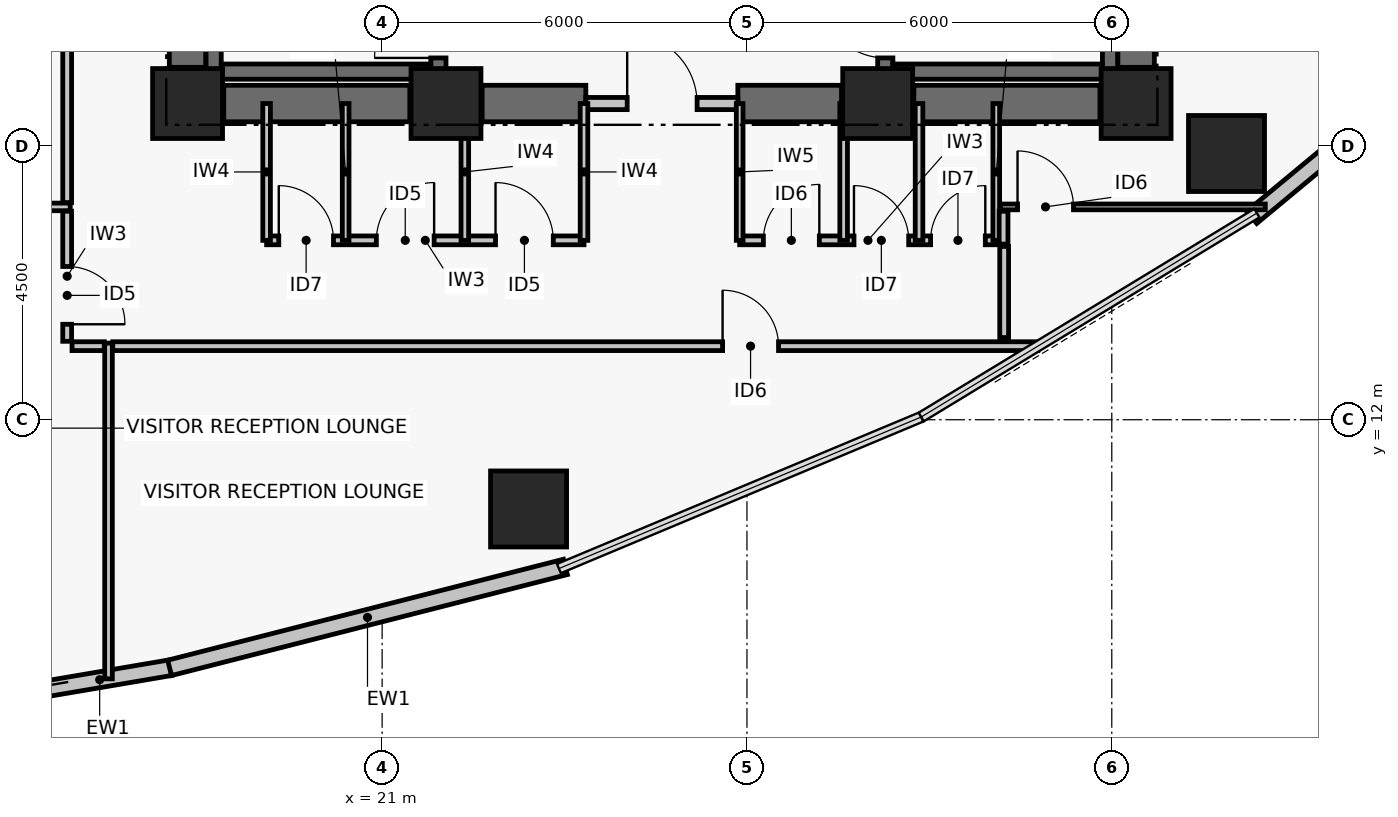
"""IFC4 building model, lengths in metres.
Left out: names, types, materials, properties, quantities, classifications, styles, units other than length and angle.
Written with IfcOpenShell. Run it as: python <this file> out.ifc"""

import sys

from ifc_helpers import new_model, si_unit, direction, frame, frame_2d, origin, origin_2d, place, context, subcontext, project, spatial, rectangle, hollow_rectangle, extrude, element, fill, save


model = new_model("IFC4")
c1 = context("Model", 3, precision=1e-05, world=origin(), true_north=direction((0.0, 1.0)))
c2 = subcontext(c1, "Body", "Model", "MODEL_VIEW")
j1 = project(units=[si_unit("LENGTHUNIT", "METRE"), si_unit("PLANEANGLEUNIT", "RADIAN")], contexts=[c1])
p1 = place(None, origin())
s1 = spatial("IfcSite", under=j1, at=p1, CompositionType="ELEMENT")
p2 = place(p1, origin())
s2 = spatial("IfcBuilding", under=s1, at=p2, CompositionType="ELEMENT")
p3 = place(p2, frame((0.0, 0.0, 72.24)))
s3 = spatial("IfcBuildingStorey", under=s2, at=p3, CompositionType="ELEMENT", Elevation=72.24)
for number, where, z_axis, x_axis in (
    (1, (17.8, 17.2, 0.0), (0.0, 0.0, 1.0), (1.0, 0.0, 0.0)),
    (2, (22.05, 17.2, 0.0), (0.0, 0.0, 1.0), (1.0, 0.0, 0.0)),
    (3, (29.15, 17.2, 0.0), (0.0, 0.0, 1.0), (1.0, 0.0, 0.0)),
    (4, (33.4, 17.2, 0.0), (0.0, 0.0, 1.0), (1.0, 0.0, 0.0)),
):
    element("IfcColumn", number, at=place(p3, frame(where, z_axis=z_axis, x_axis=x_axis)), inside=s3, PredefinedType="COLUMN", context=c2, shape_type="SweptSolid", body=[
        extrude(rectangle(XDim=1.15, YDim=1.15, at=origin_2d()), origin(), (0.0, 0.0, 1.0), 3.72),
    ])
p4 = place(p3, frame((18.395, 17.2, 0.0), z_axis=(0.0, 0.0, 1.0), x_axis=(1.0, 0.0, 0.0)))
e5 = element("IfcWall", 5, at=p4, inside=s3, PredefinedType="SHEAR", context=c2, shape_type="SweptSolid", body=[
    extrude(rectangle(XDim=3.06, YDim=0.6, at=frame_2d((1.53, 0.0))), origin(), (0.0, 0.0, 1.0), 3.47),
])
p5 = place(p3, frame((22.645, 17.2, 0.0), z_axis=(0.0, 0.0, 1.0), x_axis=(1.0, 0.0, 0.0)))
e6 = element("IfcWall", 6, at=p5, inside=s3, PredefinedType="SHEAR", context=c2, shape_type="SweptSolid", body=[
    extrude(rectangle(XDim=1.705, YDim=0.6, at=frame_2d((0.853, 0.0))), origin(), (0.0, 0.0, 1.0), 3.47),
])
p6 = place(p3, frame((26.85, 17.2, 0.0), z_axis=(0.0, 0.0, 1.0), x_axis=(1.0, 0.0, 0.0)))
e7 = element("IfcWall", 7, at=p6, inside=s3, PredefinedType="SHEAR", context=c2, shape_type="SweptSolid", body=[
    extrude(rectangle(XDim=1.705, YDim=0.6, at=frame_2d((0.853, 0.0))), origin(), (0.0, 0.0, 1.0), 3.47),
])
p7 = place(p3, frame((29.745, 17.2, 0.0), z_axis=(0.0, 0.0, 1.0), x_axis=(1.0, 0.0, 0.0)))
e8 = element("IfcWall", 8, at=p7, inside=s3, PredefinedType="SHEAR", context=c2, shape_type="SweptSolid", body=[
    extrude(rectangle(XDim=3.06, YDim=0.6, at=frame_2d((1.53, 0.0))), origin(), (0.0, 0.0, 1.0), 3.47),
])
for number, where, z_axis, x_axis in (
    (9, (17.8, 17.795, 0.0), (0.0, 0.0, 1.0), (0.0, 1.0, 0.0)),
    (10, (33.4, 17.795, 0.0), (0.0, 0.0, 1.0), (0.0, 1.0, 0.0)),
):
    element("IfcWall", number, at=place(p3, frame(where, z_axis=z_axis, x_axis=x_axis)), inside=s3, PredefinedType="SHEAR", context=c2, shape_type="SweptSolid", body=[
        extrude(rectangle(XDim=8.41, YDim=0.6, at=frame_2d((4.205, 0.0))), origin(), (0.0, 0.0, 1.0), 3.47),
    ])
p8 = place(p3, frame((18.229, 17.6, 0.0), z_axis=(0.0, 0.0, 1.0), x_axis=(0.0, 1.0, 0.0)))
e11 = element("IfcWall", 11, at=p8, inside=s3, PredefinedType="SHEAR", context=c2, shape_type="SweptSolid", body=[
    extrude(rectangle(XDim=8.8, YDim=0.25, at=frame_2d((4.4, 0.0))), origin(), (0.0, 0.0, 1.0), 3.47),
])
p9 = place(p3, frame((21.925, 17.6, 0.0), z_axis=(0.0, 0.0, 1.0), x_axis=(0.0, 1.0, 0.0)))
e12 = element("IfcWall", 12, at=p9, inside=s3, PredefinedType="SHEAR", context=c2, shape_type="SweptSolid", body=[
    extrude(rectangle(XDim=8.8, YDim=0.25, at=frame_2d((4.4, 0.0))), origin(), (0.0, 0.0, 1.0), 3.47),
])
p10 = place(p9, frame((0.35, 0.0, 0.0)))
e13 = element("IfcOpeningElement", 13, at=p10, cuts=e12, PredefinedType="OPENING", context=c2, shape_type="SweptSolid", body=[
    extrude(rectangle(XDim=1.05, YDim=2.08, at=frame_2d((0.525, 1.04))), frame((0.0, 0.135, 0.0), z_axis=(0.0, -1.0, 0.0), x_axis=(1.0, 0.0, 0.0)), (0.0, 0.0, 1.0), 0.27),
])
p11 = place(p3, frame((18.354, 17.725, 0.0), z_axis=(0.0, 0.0, 1.0), x_axis=(1.0, 0.0, 0.0)))
e14 = element("IfcWall", 14, at=p11, inside=s3, PredefinedType="SHEAR", context=c2, shape_type="SweptSolid", body=[
    extrude(rectangle(XDim=3.446, YDim=0.25, at=frame_2d((1.723, 0.0))), origin(), (0.0, 0.0, 1.0), 3.47),
])
p12 = place(p3, frame((29.275, 17.6, 0.0), z_axis=(0.0, 0.0, 1.0), x_axis=(0.0, 1.0, 0.0)))
e15 = element("IfcWall", 15, at=p12, inside=s3, PredefinedType="SHEAR", context=c2, shape_type="SweptSolid", body=[
    extrude(rectangle(XDim=8.8, YDim=0.25, at=frame_2d((4.4, 0.0))), origin(), (0.0, 0.0, 1.0), 3.47),
])
p13 = place(p12, frame((0.35, 0.0, 0.0)))
e16 = element("IfcOpeningElement", 16, at=p13, cuts=e15, PredefinedType="OPENING", context=c2, shape_type="SweptSolid", body=[
    extrude(rectangle(XDim=1.05, YDim=2.08, at=frame_2d((0.525, 1.04))), frame((0.0, 0.135, 0.0), z_axis=(0.0, -1.0, 0.0), x_axis=(1.0, 0.0, 0.0)), (0.0, 0.0, 1.0), 0.27),
])
p14 = place(p3, frame((32.971, 17.6, 0.0), z_axis=(0.0, 0.0, 1.0), x_axis=(0.0, 1.0, 0.0)))
e17 = element("IfcWall", 17, at=p14, inside=s3, PredefinedType="SHEAR", context=c2, shape_type="SweptSolid", body=[
    extrude(rectangle(XDim=8.8, YDim=0.25, at=frame_2d((4.4, 0.0))), origin(), (0.0, 0.0, 1.0), 3.47),
])
p15 = place(p3, frame((29.4, 17.725, 0.0), z_axis=(0.0, 0.0, 1.0), x_axis=(1.0, 0.0, 0.0)))
e18 = element("IfcWall", 18, at=p15, inside=s3, PredefinedType="SHEAR", context=c2, shape_type="SweptSolid", body=[
    extrude(rectangle(XDim=3.446, YDim=0.25, at=frame_2d((1.723, 0.0))), origin(), (0.0, 0.0, 1.0), 3.47),
])
for number, where, z_axis, x_axis in (
    (19, (23.408, 10.533, 0.0), (0.0, 0.0, 1.0), (1.0, 0.0, 0.0)),
    (20, (34.887, 16.378, 0.0), (0.0, 0.0, 1.0), (1.0, 0.0, 0.0)),
):
    element("IfcColumn", number, at=place(p3, frame(where, z_axis=z_axis, x_axis=x_axis)), inside=s3, PredefinedType="COLUMN", context=c2, shape_type="SweptSolid", body=[
        extrude(hollow_rectangle(XDim=1.25, YDim=1.25, WallThickness=0.05, at=origin_2d()), origin(), (0.0, 0.0, 1.0), 3.72),
    ])
p16 = place(p3, frame((17.516, 7.922, 0.0), z_axis=(0.0, 0.0, 1.0), x_axis=(-0.985905269947, -0.167304508875, 0.0)))
e21 = element("IfcWall", 21, at=p16, inside=s3, PredefinedType="PARTITIONING", context=c2, shape_type="SweptSolid", body=[
    extrude(rectangle(XDim=2.357, YDim=0.26, at=frame_2d((1.178, 0.0))), origin(), (0.0, 0.0, 1.0), 3.47),
])
p17 = place(p3, frame((24.014, 9.58, 0.0), z_axis=(0.0, 0.0, 1.0), x_axis=(-0.968981437296, -0.247133514876, 0.0)))
e22 = element("IfcWall", 22, at=p17, inside=s3, PredefinedType="PARTITIONING", context=c2, shape_type="SweptSolid", body=[
    extrude(rectangle(XDim=6.718, YDim=0.26, at=frame_2d((3.359, 0.0))), origin(), (0.0, 0.0, 1.0), 3.47),
])
p18 = place(p3, frame((40.472, 19.616, 0.0), z_axis=(0.0, 0.0, 1.0), x_axis=(-0.76975316947, -0.638341646841, 0.0)))
e23 = element("IfcWall", 23, at=p18, inside=s3, PredefinedType="PARTITIONING", context=c2, shape_type="SweptSolid", body=[
    extrude(rectangle(XDim=6.718, YDim=0.26, at=frame_2d((3.359, 0.0))), origin(), (0.0, 0.0, 1.0), 3.47),
])
p19 = place(p3, frame((24.35, 17.2, 0.0), z_axis=(0.0, 0.0, 1.0), x_axis=(1.0, 0.0, 0.0)))
e24 = element("IfcWall", 24, at=p19, inside=s3, PredefinedType="PARTITIONING", context=c2, shape_type="SweptSolid", body=[
    extrude(rectangle(XDim=2.5, YDim=0.2, at=frame_2d((1.25, 0.0))), origin(), (0.0, 0.0, 1.0), 2.6),
])
p20 = place(p19, frame((0.68, 0.0, 0.0)))
e25 = element("IfcOpeningElement", 25, at=p20, cuts=e24, PredefinedType="OPENING", context=c2, shape_type="SweptSolid", body=[
    extrude(rectangle(XDim=1.15, YDim=2.08, at=frame_2d((0.575, 1.04))), frame((0.0, 0.11, 0.0), z_axis=(0.0, -1.0, 0.0), x_axis=(1.0, 0.0, 0.0)), (0.0, 0.0, 1.0), 0.22),
])
p21 = place(p3, frame((19.1, 14.95, 0.0), z_axis=(0.0, 0.0, 1.0), x_axis=(1.0, 0.0, 0.0)))
e26 = element("IfcWall", 26, at=p21, inside=s3, PredefinedType="PARTITIONING", context=c2, shape_type="SweptSolid", body=[
    extrude(rectangle(XDim=5.22, YDim=0.145, at=frame_2d((2.61, 0.0))), origin(), (0.0, 0.0, 1.0), 2.6),
])
p22 = place(p21, frame((0.2, 0.0, 0.0)))
e27 = element("IfcOpeningElement", 27, at=p22, cuts=e26, PredefinedType="OPENING", context=c2, shape_type="SweptSolid", body=[
    extrude(rectangle(XDim=0.9, YDim=2.02, at=frame_2d((0.45, 1.01))), frame((0.0, 0.083, 0.0), z_axis=(0.0, -1.0, 0.0), x_axis=(1.0, 0.0, 0.0)), (0.0, 0.0, 1.0), 0.165),
])
p23 = place(p21, frame((1.805, 0.0, 0.0)))
e28 = element("IfcOpeningElement", 28, at=p23, cuts=e26, PredefinedType="OPENING", context=c2, shape_type="SweptSolid", body=[
    extrude(rectangle(XDim=0.95, YDim=2.06, at=frame_2d((0.475, 1.03))), frame((0.0, 0.083, 0.0), z_axis=(0.0, -1.0, 0.0), x_axis=(1.0, 0.0, 0.0)), (0.0, 0.0, 1.0), 0.165),
])
p24 = place(p21, frame((3.765, 0.0, 0.0)))
e29 = element("IfcOpeningElement", 29, at=p24, cuts=e26, PredefinedType="OPENING", context=c2, shape_type="SweptSolid", body=[
    extrude(rectangle(XDim=0.95, YDim=2.06, at=frame_2d((0.475, 1.03))), frame((0.0, 0.083, 0.0), z_axis=(0.0, -1.0, 0.0), x_axis=(1.0, 0.0, 0.0)), (0.0, 0.0, 1.0), 0.165),
])
p25 = place(p3, frame((26.88, 14.95, 0.0), z_axis=(0.0, 0.0, 1.0), x_axis=(1.0, 0.0, 0.0)))
e30 = element("IfcWall", 30, at=p25, inside=s3, PredefinedType="PARTITIONING", context=c2, shape_type="SweptSolid", body=[
    extrude(rectangle(XDim=4.22, YDim=0.145, at=frame_2d((2.11, 0.0))), origin(), (0.0, 0.0, 1.0), 3.0),
])
p26 = place(p25, frame((0.39, 0.0, 0.0)))
e31 = element("IfcOpeningElement", 31, at=p26, cuts=e30, PredefinedType="OPENING", context=c2, shape_type="SweptSolid", body=[
    extrude(rectangle(XDim=0.92, YDim=2.05, at=frame_2d((0.46, 1.025))), frame((0.0, 0.083, 0.0), z_axis=(0.0, -1.0, 0.0), x_axis=(1.0, 0.0, 0.0)), (0.0, 0.0, 1.0), 0.165),
])
p27 = place(p25, frame((1.88, 0.0, 0.0)))
e32 = element("IfcOpeningElement", 32, at=p27, cuts=e30, PredefinedType="OPENING", context=c2, shape_type="SweptSolid", body=[
    extrude(rectangle(XDim=0.9, YDim=2.02, at=frame_2d((0.45, 1.01))), frame((0.0, 0.083, 0.0), z_axis=(0.0, -1.0, 0.0), x_axis=(1.0, 0.0, 0.0)), (0.0, 0.0, 1.0), 0.165),
])
p28 = place(p25, frame((3.14, 0.0, 0.0)))
e33 = element("IfcOpeningElement", 33, at=p28, cuts=e30, PredefinedType="OPENING", context=c2, shape_type="SweptSolid", body=[
    extrude(rectangle(XDim=0.9, YDim=2.02, at=frame_2d((0.45, 1.01))), frame((0.0, 0.083, 0.0), z_axis=(0.0, -1.0, 0.0), x_axis=(1.0, 0.0, 0.0)), (0.0, 0.0, 1.0), 0.165),
])
p29 = place(p3, frame((19.1, 14.95, 0.0), z_axis=(0.0, 0.0, 1.0), x_axis=(0.0, 1.0, 0.0)))
e34 = element("IfcWall", 34, at=p29, inside=s3, PredefinedType="PARTITIONING", context=c2, shape_type="SweptSolid", body=[
    extrude(rectangle(XDim=2.25, YDim=0.125, at=frame_2d((1.125, 0.0))), origin(), (0.0, 0.0, 1.0), 2.6),
])
p30 = place(p3, frame((20.4, 14.95, 0.0), z_axis=(0.0, 0.0, 1.0), x_axis=(0.0, 1.0, 0.0)))
e35 = element("IfcWall", 35, at=p30, inside=s3, PredefinedType="PARTITIONING", context=c2, shape_type="SweptSolid", body=[
    extrude(rectangle(XDim=2.25, YDim=0.11, at=frame_2d((1.125, 0.0))), origin(), (0.0, 0.0, 1.0), 2.6),
])
for number, where, z_axis, x_axis in (
    (36, (22.36, 14.95, 0.0), (0.0, 0.0, 1.0), (0.0, 1.0, 0.0)),
    (37, (24.32, 14.95, 0.0), (0.0, 0.0, 1.0), (0.0, 1.0, 0.0)),
):
    element("IfcWall", number, at=place(p3, frame(where, z_axis=z_axis, x_axis=x_axis)), inside=s3, PredefinedType="PARTITIONING", context=c2, shape_type="SweptSolid", body=[
        extrude(rectangle(XDim=2.25, YDim=0.125, at=frame_2d((1.125, 0.0))), origin(), (0.0, 0.0, 1.0), 2.6),
    ])
p31 = place(p3, frame((26.88, 14.95, 0.0), z_axis=(0.0, 0.0, 1.0), x_axis=(0.0, 1.0, 0.0)))
e38 = element("IfcWall", 38, at=p31, inside=s3, PredefinedType="PARTITIONING", context=c2, shape_type="SweptSolid", body=[
    extrude(rectangle(XDim=2.25, YDim=0.11, at=frame_2d((1.125, 0.0))), origin(), (0.0, 0.0, 1.0), 2.6),
])
for number, where, z_axis, x_axis in (
    (39, (28.59, 14.95, 0.0), (0.0, 0.0, 1.0), (0.0, 1.0, 0.0)),
    (40, (29.83, 14.95, 0.0), (0.0, 0.0, 1.0), (0.0, 1.0, 0.0)),
):
    element("IfcWall", number, at=place(p3, frame(where, z_axis=z_axis, x_axis=x_axis)), inside=s3, PredefinedType="PARTITIONING", context=c2, shape_type="SweptSolid", body=[
        extrude(rectangle(XDim=2.25, YDim=0.125, at=frame_2d((1.125, 0.0))), origin(), (0.0, 0.0, 1.0), 2.6),
    ])
p32 = place(p3, frame((31.1, 14.95, 0.0), z_axis=(0.0, 0.0, 1.0), x_axis=(0.0, 1.0, 0.0)))
e41 = element("IfcWall", 41, at=p32, inside=s3, PredefinedType="PARTITIONING", context=c2, shape_type="SweptSolid", body=[
    extrude(rectangle(XDim=2.25, YDim=0.11, at=frame_2d((1.125, 0.0))), origin(), (0.0, 0.0, 1.0), 2.6),
])
p33 = place(p3, frame((15.82, 21.93, 0.0), z_axis=(0.0, 0.0, 1.0), x_axis=(0.0, -1.0, 0.0)))
e42 = element("IfcWall", 42, at=p33, inside=s3, PredefinedType="PARTITIONING", context=c2, shape_type="SweptSolid", body=[
    extrude(rectangle(XDim=6.36, YDim=0.145, at=frame_2d((3.18, 0.0))), origin(), (0.0, 0.0, 1.0), 2.6),
])
p34 = place(p33, frame((0.28, 0.0, 0.0)))
e43 = element("IfcOpeningElement", 43, at=p34, cuts=e42, PredefinedType="OPENING", context=c2, shape_type="SweptSolid", body=[
    extrude(rectangle(XDim=0.95, YDim=2.06, at=frame_2d((0.475, 1.03))), frame((0.0, 0.083, 0.0), z_axis=(0.0, -1.0, 0.0), x_axis=(1.0, 0.0, 0.0)), (0.0, 0.0, 1.0), 0.165),
])
p35 = place(p3, frame((15.82, 15.43, 0.0), z_axis=(0.0, 0.0, 1.0), x_axis=(0.0, -1.0, 0.0)))
e44 = element("IfcWall", 44, at=p35, inside=s3, PredefinedType="PARTITIONING", context=c2, shape_type="SweptSolid", body=[
    extrude(rectangle(XDim=2.14, YDim=0.145, at=frame_2d((1.07, 0.0))), origin(), (0.0, 0.0, 1.0), 3.0),
])
p36 = place(p35, frame((0.91, 0.0, 0.0)))
e45 = element("IfcOpeningElement", 45, at=p36, cuts=e44, PredefinedType="OPENING", context=c2, shape_type="SweptSolid", body=[
    extrude(rectangle(XDim=0.95, YDim=2.06, at=frame_2d((0.475, 1.03))), frame((0.0, 0.083, 0.0), z_axis=(0.0, -1.0, 0.0), x_axis=(1.0, 0.0, 0.0)), (0.0, 0.0, 1.0), 0.165),
])
p37 = place(p3, frame((15.9, 13.21, 0.0), z_axis=(0.0, 0.0, 1.0), x_axis=(1.0, 0.0, 0.0)))
e46 = element("IfcWall", 46, at=p37, inside=s3, PredefinedType="PARTITIONING", context=c2, shape_type="SweptSolid", body=[
    extrude(rectangle(XDim=0.53, YDim=0.145, at=frame_2d((0.265, 0.0))), origin(), (0.0, 0.0, 1.0), 2.6),
])
p38 = place(p3, frame((16.57, 13.21, 0.0), z_axis=(0.0, 0.0, 1.0), x_axis=(1.0, 0.0, 0.0)))
e47 = element("IfcWall", 47, at=p38, inside=s3, PredefinedType="PARTITIONING", context=c2, shape_type="SweptSolid", body=[
    extrude(rectangle(XDim=15.214, YDim=0.145, at=frame_2d((7.607, 0.0))), origin(), (0.0, 0.0, 1.0), 2.6),
])
p39 = place(p38, frame((10.029, 0.0, 0.0)))
e48 = element("IfcOpeningElement", 48, at=p39, cuts=e47, PredefinedType="OPENING", context=c2, shape_type="SweptSolid", body=[
    extrude(rectangle(XDim=0.92, YDim=2.05, at=frame_2d((0.46, 1.025))), frame((0.0, 0.083, 0.0), z_axis=(0.0, -1.0, 0.0), x_axis=(1.0, 0.0, 0.0)), (0.0, 0.0, 1.0), 0.165),
])
p40 = place(p3, frame((31.23, 13.351, 0.0), z_axis=(0.0, 0.0, 1.0), x_axis=(0.0, 1.0, 0.0)))
e49 = element("IfcWall", 49, at=p40, inside=s3, PredefinedType="PARTITIONING", context=c2, shape_type="SweptSolid", body=[
    extrude(rectangle(XDim=1.499, YDim=0.145, at=frame_2d((0.75, 0.0))), origin(), (0.0, 0.0, 1.0), 2.85),
])
p41 = place(p3, frame((31.22, 14.889, 0.0), z_axis=(0.0, 0.0, 1.0), x_axis=(0.0, 1.0, 0.0)))
e50 = element("IfcWall", 50, at=p41, inside=s3, PredefinedType="PARTITIONING", context=c2, shape_type="SweptSolid", body=[
    extrude(rectangle(XDim=0.541, YDim=0.145, at=frame_2d((0.271, 0.0))), origin(), (0.0, 0.0, 1.0), 3.0),
])
p42 = place(p3, frame((16.5, 7.739, 0.0), z_axis=(0.0, 0.0, 1.0), x_axis=(0.0, 1.0, 0.0)))
e51 = element("IfcWall", 51, at=p42, inside=s3, PredefinedType="PARTITIONING", context=c2, shape_type="SweptSolid", body=[
    extrude(rectangle(XDim=5.521, YDim=0.125, at=frame_2d((2.76, 0.0))), origin(), (0.0, 0.0, 1.0), 2.6),
])
p43 = place(p3, frame((11.644, 15.5, 0.0), z_axis=(0.0, 0.0, 1.0), x_axis=(1.0, 0.0, 0.0)))
e52 = element("IfcWall", 52, at=p43, inside=s3, PredefinedType="PARTITIONING", context=c2, shape_type="SweptSolid", body=[
    extrude(rectangle(XDim=4.227, YDim=0.125, at=frame_2d((2.113, 0.0))), origin(), (0.0, 0.0, 1.0), 2.85),
])
p44 = place(p3, frame((31.17, 15.5, 0.0), z_axis=(0.0, 0.0, 1.0), x_axis=(1.0, 0.0, 0.0)))
e53 = element("IfcWall", 53, at=p44, inside=s3, PredefinedType="PARTITIONING", context=c2, shape_type="SweptSolid", body=[
    extrude(rectangle(XDim=4.354, YDim=0.095, at=frame_2d((2.177, 0.0))), origin(), (0.0, 0.0, 1.0), 2.85),
])
p45 = place(p44, frame((0.28, 0.0, 0.0)))
e54 = element("IfcOpeningElement", 54, at=p45, cuts=e53, PredefinedType="OPENING", context=c2, shape_type="SweptSolid", body=[
    extrude(rectangle(XDim=0.92, YDim=2.05, at=frame_2d((0.46, 1.025))), frame((0.0, 0.057, 0.0), z_axis=(0.0, -1.0, 0.0), x_axis=(1.0, 0.0, 0.0)), (0.0, 0.0, 1.0), 0.115),
])
p46 = place(p10, origin())
e55 = element("IfcDoor", 55, at=p46, inside=s3, OperationType="SINGLE_SWING_LEFT", PredefinedType="DOOR", context=c2, shape_type="SweptSolid", body=[
    extrude(rectangle(XDim=1.05, YDim=2.08, at=frame_2d((0.525, 1.04))), frame((0.0, 0.025, 0.0), z_axis=(0.0, -1.0, 0.0), x_axis=(1.0, 0.0, 0.0)), (0.0, 0.0, 1.0), 0.05),
])
fill(e13, e55)
p47 = place(p13, origin())
e56 = element("IfcDoor", 56, at=p47, inside=s3, OperationType="SINGLE_SWING_RIGHT", PredefinedType="DOOR", context=c2, shape_type="SweptSolid", body=[
    extrude(rectangle(XDim=1.05, YDim=2.08, at=frame_2d((0.525, 1.04))), frame((0.0, 0.025, 0.0), z_axis=(0.0, -1.0, 0.0), x_axis=(1.0, 0.0, 0.0)), (0.0, 0.0, 1.0), 0.05),
])
fill(e16, e56)
p48 = place(p20, origin())
e57 = element("IfcDoor", 57, at=p48, inside=s3, OperationType="SINGLE_SWING_LEFT", PredefinedType="DOOR", context=c2, shape_type="SweptSolid", body=[
    extrude(rectangle(XDim=1.15, YDim=2.08, at=frame_2d((0.575, 1.04))), frame((0.0, 0.025, 0.0), z_axis=(0.0, -1.0, 0.0), x_axis=(1.0, 0.0, 0.0)), (0.0, 0.0, 1.0), 0.05),
])
fill(e25, e57)
p49 = place(p22, origin())
e58 = element("IfcDoor", 58, at=p49, inside=s3, OperationType="SINGLE_SWING_LEFT", PredefinedType="DOOR", context=c2, shape_type="SweptSolid", body=[
    extrude(rectangle(XDim=0.9, YDim=2.02, at=frame_2d((0.45, 1.01))), frame((0.0, 0.025, 0.0), z_axis=(0.0, -1.0, 0.0), x_axis=(1.0, 0.0, 0.0)), (0.0, 0.0, 1.0), 0.05),
])
fill(e27, e58)
p50 = place(p23, origin())
e59 = element("IfcDoor", 59, at=p50, inside=s3, OperationType="SINGLE_SWING_RIGHT", PredefinedType="DOOR", context=c2, shape_type="SweptSolid", body=[
    extrude(rectangle(XDim=0.95, YDim=2.06, at=frame_2d((0.475, 1.03))), frame((0.0, 0.025, 0.0), z_axis=(0.0, -1.0, 0.0), x_axis=(1.0, 0.0, 0.0)), (0.0, 0.0, 1.0), 0.05),
])
fill(e28, e59)
p51 = place(p24, origin())
e60 = element("IfcDoor", 60, at=p51, inside=s3, OperationType="SINGLE_SWING_LEFT", PredefinedType="DOOR", context=c2, shape_type="SweptSolid", body=[
    extrude(rectangle(XDim=0.95, YDim=2.06, at=frame_2d((0.475, 1.03))), frame((0.0, 0.025, 0.0), z_axis=(0.0, -1.0, 0.0), x_axis=(1.0, 0.0, 0.0)), (0.0, 0.0, 1.0), 0.05),
])
fill(e29, e60)
p52 = place(p26, origin())
e61 = element("IfcDoor", 61, at=p52, inside=s3, OperationType="SINGLE_SWING_RIGHT", PredefinedType="DOOR", context=c2, shape_type="SweptSolid", body=[
    extrude(rectangle(XDim=0.92, YDim=2.05, at=frame_2d((0.46, 1.025))), frame((0.0, 0.025, 0.0), z_axis=(0.0, -1.0, 0.0), x_axis=(1.0, 0.0, 0.0)), (0.0, 0.0, 1.0), 0.05),
])
fill(e31, e61)
p53 = place(p27, origin())
e62 = element("IfcDoor", 62, at=p53, inside=s3, OperationType="SINGLE_SWING_LEFT", PredefinedType="DOOR", context=c2, shape_type="SweptSolid", body=[
    extrude(rectangle(XDim=0.9, YDim=2.02, at=frame_2d((0.45, 1.01))), frame((0.0, 0.025, 0.0), z_axis=(0.0, -1.0, 0.0), x_axis=(1.0, 0.0, 0.0)), (0.0, 0.0, 1.0), 0.05),
])
fill(e32, e62)
p54 = place(p28, origin())
e63 = element("IfcDoor", 63, at=p54, inside=s3, OperationType="SINGLE_SWING_RIGHT", PredefinedType="DOOR", context=c2, shape_type="SweptSolid", body=[
    extrude(rectangle(XDim=0.9, YDim=2.02, at=frame_2d((0.45, 1.01))), frame((0.0, 0.025, 0.0), z_axis=(0.0, -1.0, 0.0), x_axis=(1.0, 0.0, 0.0)), (0.0, 0.0, 1.0), 0.05),
])
fill(e33, e63)
p55 = place(p36, origin())
e64 = element("IfcDoor", 64, at=p55, inside=s3, OperationType="SINGLE_SWING_RIGHT", PredefinedType="DOOR", context=c2, shape_type="SweptSolid", body=[
    extrude(rectangle(XDim=0.95, YDim=2.06, at=frame_2d((0.475, 1.03))), frame((0.0, 0.025, 0.0), z_axis=(0.0, -1.0, 0.0), x_axis=(1.0, 0.0, 0.0)), (0.0, 0.0, 1.0), 0.05),
])
fill(e45, e64)
p56 = place(p39, origin())
e65 = element("IfcDoor", 65, at=p56, inside=s3, OperationType="SINGLE_SWING_LEFT", PredefinedType="DOOR", context=c2, shape_type="SweptSolid", body=[
    extrude(rectangle(XDim=0.92, YDim=2.05, at=frame_2d((0.46, 1.025))), frame((0.0, 0.025, 0.0), z_axis=(0.0, -1.0, 0.0), x_axis=(1.0, 0.0, 0.0)), (0.0, 0.0, 1.0), 0.05),
])
fill(e48, e65)
p57 = place(p45, origin())
e66 = element("IfcDoor", 66, at=p57, inside=s3, OperationType="SINGLE_SWING_LEFT", PredefinedType="DOOR", context=c2, shape_type="SweptSolid", body=[
    extrude(rectangle(XDim=0.92, YDim=2.05, at=frame_2d((0.46, 1.025))), frame((0.0, 0.025, 0.0), z_axis=(0.0, -1.0, 0.0), x_axis=(1.0, 0.0, 0.0)), (0.0, 0.0, 1.0), 0.05),
])
fill(e54, e66)
save(model, sys.argv[1])
